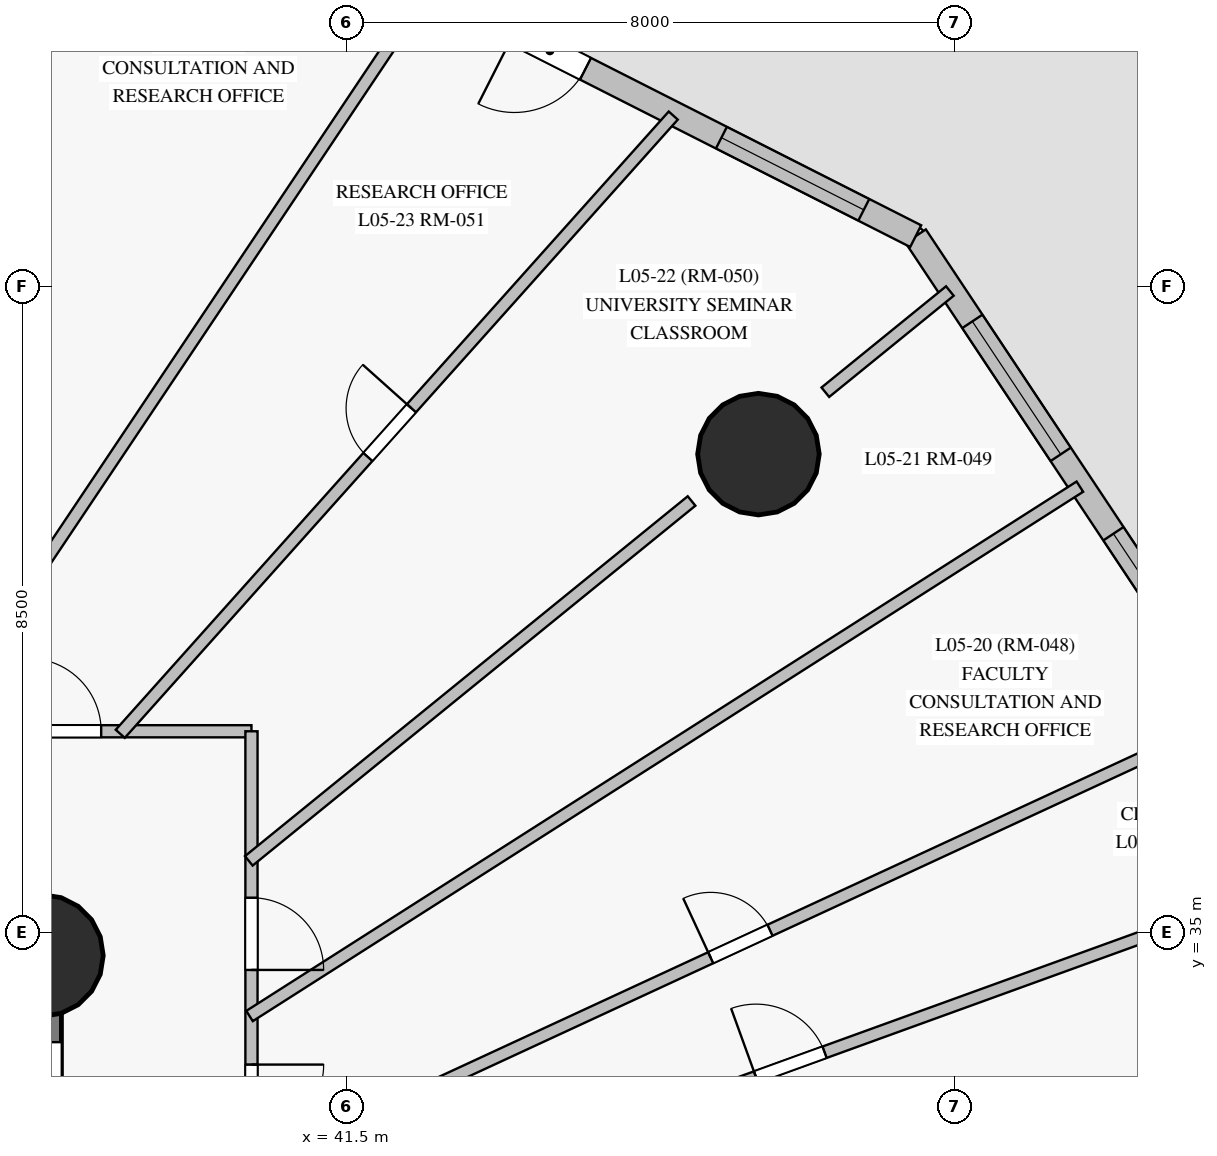
"""IFC4 building model, lengths in metres.
Left out: names, types, materials, properties, quantities, classifications, styles, units other than length and angle.
Written with IfcOpenShell. Run it as: python <this file> out.ifc"""

import sys

from ifc_helpers import new_model, si_unit, direction, frame, frame_2d, origin, origin_with_axes, origin_2d, place, context, subcontext, project, spatial, rectangle, circle, extrude, source, transform, mapped, element, fill, save


model = new_model("IFC4")
c1 = context("Model", 3, precision=1e-05, world=origin(), true_north=direction((0.0, 1.0)))
c2 = subcontext(c1, "Body", "Model", "MODEL_VIEW")
j1 = project(units=[si_unit("LENGTHUNIT", "METRE"), si_unit("PLANEANGLEUNIT", "RADIAN")], contexts=[c1])
p1 = place(None, origin())
s1 = spatial("IfcSite", under=j1, at=p1, CompositionType="ELEMENT")
p2 = place(p1, origin())
s2 = spatial("IfcBuilding", under=s1, at=p2, CompositionType="ELEMENT")
p3 = place(p2, frame((0.0, 0.0, 22.5)))
s3 = spatial("IfcBuildingStorey", under=s2, at=p3, CompositionType="ELEMENT", Elevation=22.5)
p4 = place(p3, frame((37.5, 18.3, 0.0), z_axis=(0.0, 0.0, 1.0), x_axis=(0.0, 1.0, 0.0)))
e1 = element("IfcWall", 1, at=p4, inside=s3, PredefinedType="SHEAR", context=c2, shape_type="SweptSolid", body=[
    extrude(rectangle(XDim=16.4, YDim=0.5, at=frame_2d((8.2, 0.0))), origin(), (0.0, 0.0, 1.0), 3.75),
])
p5 = place(p4, frame((14.06, 0.0, 0.0)))
e2 = element("IfcOpeningElement", 2, at=p5, cuts=e1, PredefinedType="OPENING", context=c2, shape_type="SweptSolid", body=[
    extrude(rectangle(XDim=1.2, YDim=2.15, at=frame_2d((0.6, 1.075))), frame((0.0, 0.26, 0.0), z_axis=(0.0, -1.0, 0.0), x_axis=(1.0, 0.0, 0.0)), (0.0, 0.0, 1.0), 0.52),
])
m1 = source(origin_with_axes(), c2, "Body", "SweptSolid", [
    extrude(circle(Radius=0.8, at=origin_2d()), origin(), (0.0, 0.0, 1.0), 4.0),
])
for number, where, z_axis, x_axis in (
    (3, (37.5, 34.7, 0.0), (0.0, 0.0, 1.0), (1.0, 0.0, 0.0)),
    (4, (46.92, 41.296, 0.0), (0.0, 0.0, 1.0), (1.0, 0.0, 0.0)),
):
    element("IfcColumn", number, at=place(p3, frame(where, z_axis=z_axis, x_axis=x_axis)), inside=s3, PredefinedType="COLUMN", context=c2, shape_type="MappedRepresentation", body=[
        mapped(m1, transform((0.0, 0.0, 0.0), scale=1.0)),
    ])
p6 = place(p3, frame((56.4, 33.01, 0.0), z_axis=(0.0, 0.0, 1.0), x_axis=(-0.553428968968, 0.832896377893, 0.0)))
e5 = element("IfcWall", 5, at=p6, inside=s3, PredefinedType="SOLIDWALL", context=c2, shape_type="SweptSolid", body=[
    extrude(rectangle(XDim=13.391, YDim=0.32, at=frame_2d((6.696, 0.0))), origin(), (0.0, 0.0, 1.0), 3.75),
])
p7 = place(p6, frame((1.064, 0.0, 0.85)))
e6 = element("IfcOpeningElement", 6, at=p7, cuts=e5, PredefinedType="OPENING", context=c2, shape_type="SweptSolid", body=[
    extrude(rectangle(XDim=1.8, YDim=1.85, at=frame_2d((0.9, 0.925))), frame((0.0, 0.17, 0.0), z_axis=(0.0, -1.0, 0.0), x_axis=(1.0, 0.0, 0.0)), (0.0, 0.0, 1.0), 0.34),
])
p8 = place(p6, frame((3.884, 0.0, 0.85)))
e7 = element("IfcOpeningElement", 7, at=p8, cuts=e5, PredefinedType="OPENING", context=c2, shape_type="SweptSolid", body=[
    extrude(rectangle(XDim=1.5, YDim=1.85, at=frame_2d((0.75, 0.925))), frame((0.0, 0.17, 0.0), z_axis=(0.0, -1.0, 0.0), x_axis=(1.0, 0.0, 0.0)), (0.0, 0.0, 1.0), 0.34),
])
p9 = place(p6, frame((6.591, 0.0, 0.85)))
e8 = element("IfcOpeningElement", 8, at=p9, cuts=e5, PredefinedType="OPENING", context=c2, shape_type="SweptSolid", body=[
    extrude(rectangle(XDim=2.1, YDim=1.95, at=frame_2d((1.05, 0.975))), frame((0.0, 0.17, 0.0), z_axis=(0.0, -1.0, 0.0), x_axis=(1.0, 0.0, 0.0)), (0.0, 0.0, 1.0), 0.34),
])
p10 = place(p6, frame((9.945, 0.0, 0.85)))
e9 = element("IfcOpeningElement", 9, at=p10, cuts=e5, PredefinedType="OPENING", context=c2, shape_type="SweptSolid", body=[
    extrude(rectangle(XDim=2.1, YDim=1.95, at=frame_2d((1.05, 0.975))), frame((0.0, 0.17, 0.0), z_axis=(0.0, -1.0, 0.0), x_axis=(1.0, 0.0, 0.0)), (0.0, 0.0, 1.0), 0.34),
])
p11 = place(p3, frame((48.989, 44.164, 0.0), z_axis=(0.0, 0.0, 1.0), x_axis=(-0.891951959997, 0.452130181539, 0.0)))
e10 = element("IfcWall", 10, at=p11, inside=s3, PredefinedType="SOLIDWALL", context=c2, shape_type="SweptSolid", body=[
    extrude(rectangle(XDim=10.79, YDim=0.32, at=frame_2d((5.395, 0.0))), origin(), (0.0, 0.0, 1.0), 3.75),
])
p12 = place(p11, frame((0.766, 0.0, 0.85)))
e11 = element("IfcOpeningElement", 11, at=p12, cuts=e10, PredefinedType="OPENING", context=c2, shape_type="SweptSolid", body=[
    extrude(rectangle(XDim=2.1, YDim=1.95, at=frame_2d((1.05, 0.975))), frame((0.0, 0.17, 0.0), z_axis=(0.0, -1.0, 0.0), x_axis=(1.0, 0.0, 0.0)), (0.0, 0.0, 1.0), 0.34),
])
p13 = place(p11, frame((7.916, 0.0, 0.85)))
e12 = element("IfcOpeningElement", 12, at=p13, cuts=e10, PredefinedType="OPENING", context=c2, shape_type="SweptSolid", body=[
    extrude(rectangle(XDim=2.1, YDim=1.95, at=frame_2d((1.05, 0.975))), frame((0.0, 0.17, 0.0), z_axis=(0.0, -1.0, 0.0), x_axis=(1.0, 0.0, 0.0)), (0.0, 0.0, 1.0), 0.34),
])
p14 = place(p11, frame((4.87, 0.0, 0.0)))
e13 = element("IfcOpeningElement", 13, at=p14, cuts=e10, PredefinedType="OPENING", context=c2, shape_type="SweptSolid", body=[
    extrude(rectangle(XDim=1.05, YDim=2.12, at=frame_2d((0.525, 1.06))), frame((0.0, 0.17, 0.0), z_axis=(0.0, -1.0, 0.0), x_axis=(1.0, 0.0, 0.0)), (0.0, 0.0, 1.0), 0.34),
])
p15 = place(p3, frame((10.5, 37.65, 0.0), z_axis=(0.0, 0.0, 1.0), x_axis=(1.0, 0.0, 0.0)))
e14 = element("IfcWall", 14, at=p15, inside=s3, PredefinedType="PARTITIONING", context=c2, shape_type="SweptSolid", body=[
    extrude(rectangle(XDim=29.75, YDim=0.16, at=frame_2d((14.875, 0.0))), origin(), (0.0, 0.0, 1.0), 3.15),
])
p16 = place(p15, frame((26.813, 0.0, 0.0)))
e15 = element("IfcOpeningElement", 15, at=p16, cuts=e14, PredefinedType="OPENING", context=c2, shape_type="SweptSolid", body=[
    extrude(rectangle(XDim=0.96, YDim=2.15, at=frame_2d((0.48, 1.075))), frame((0.0, 0.09, 0.0), z_axis=(0.0, -1.0, 0.0), x_axis=(1.0, 0.0, 0.0)), (0.0, 0.0, 1.0), 0.18),
])
p17 = place(p15, frame((24.312, 0.0, 0.0)))
e16 = element("IfcOpeningElement", 16, at=p17, cuts=e14, PredefinedType="OPENING", context=c2, shape_type="SweptSolid", body=[
    extrude(rectangle(XDim=0.95, YDim=2.15, at=frame_2d((0.475, 1.075))), frame((0.0, 0.09, 0.0), z_axis=(0.0, -1.0, 0.0), x_axis=(1.0, 0.0, 0.0)), (0.0, 0.0, 1.0), 0.18),
])
p18 = place(p15, frame((21.84, 0.0, 0.0)))
e17 = element("IfcOpeningElement", 17, at=p18, cuts=e14, PredefinedType="OPENING", context=c2, shape_type="SweptSolid", body=[
    extrude(rectangle(XDim=0.95, YDim=2.15, at=frame_2d((0.475, 1.075))), frame((0.0, 0.09, 0.0), z_axis=(0.0, -1.0, 0.0), x_axis=(1.0, 0.0, 0.0)), (0.0, 0.0, 1.0), 0.18),
])
p19 = place(p15, frame((19.498, 0.0, 0.0)))
e18 = element("IfcOpeningElement", 18, at=p19, cuts=e14, PredefinedType="OPENING", context=c2, shape_type="SweptSolid", body=[
    extrude(rectangle(XDim=0.96, YDim=2.15, at=frame_2d((0.48, 1.075))), frame((0.0, 0.09, 0.0), z_axis=(0.0, -1.0, 0.0), x_axis=(1.0, 0.0, 0.0)), (0.0, 0.0, 1.0), 0.18),
])
p20 = place(p15, frame((17.272, 0.0, 0.0)))
e19 = element("IfcOpeningElement", 19, at=p20, cuts=e14, PredefinedType="OPENING", context=c2, shape_type="SweptSolid", body=[
    extrude(rectangle(XDim=0.95, YDim=2.15, at=frame_2d((0.475, 1.075))), frame((0.0, 0.09, 0.0), z_axis=(0.0, -1.0, 0.0), x_axis=(1.0, 0.0, 0.0)), (0.0, 0.0, 1.0), 0.18),
])
p21 = place(p15, frame((15.625, 0.0, 0.0)))
e20 = element("IfcOpeningElement", 20, at=p21, cuts=e14, PredefinedType="OPENING", context=c2, shape_type="SweptSolid", body=[
    extrude(rectangle(XDim=0.95, YDim=2.15, at=frame_2d((0.475, 1.075))), frame((0.0, 0.09, 0.0), z_axis=(0.0, -1.0, 0.0), x_axis=(1.0, 0.0, 0.0)), (0.0, 0.0, 1.0), 0.18),
])
p22 = place(p15, frame((14.4, 0.0, 0.0)))
e21 = element("IfcOpeningElement", 21, at=p22, cuts=e14, PredefinedType="OPENING", context=c2, shape_type="SweptSolid", body=[
    extrude(rectangle(XDim=0.96, YDim=2.15, at=frame_2d((0.48, 1.075))), frame((0.0, 0.09, 0.0), z_axis=(0.0, -1.0, 0.0), x_axis=(1.0, 0.0, 0.0)), (0.0, 0.0, 1.0), 0.18),
])
p23 = place(p15, frame((9.938, 0.0, 0.0)))
e22 = element("IfcOpeningElement", 22, at=p23, cuts=e14, PredefinedType="OPENING", context=c2, shape_type="SweptSolid", body=[
    extrude(rectangle(XDim=0.95, YDim=2.15, at=frame_2d((0.475, 1.075))), frame((0.0, 0.09, 0.0), z_axis=(0.0, -1.0, 0.0), x_axis=(1.0, 0.0, 0.0)), (0.0, 0.0, 1.0), 0.18),
])
p24 = place(p3, frame((40.25, 37.65, 0.0), z_axis=(0.0, 0.0, 1.0), x_axis=(0.0, -1.0, 0.0)))
e23 = element("IfcWall", 23, at=p24, inside=s3, PredefinedType="PARTITIONING", context=c2, shape_type="SweptSolid", body=[
    extrude(rectangle(XDim=22.3, YDim=0.16, at=frame_2d((11.15, 0.0))), origin(), (0.0, 0.0, 1.0), 3.15),
])
p25 = place(p24, frame((16.25, 0.0, 0.0)))
e24 = element("IfcOpeningElement", 24, at=p25, cuts=e23, PredefinedType="OPENING", context=c2, shape_type="SweptSolid", body=[
    extrude(rectangle(XDim=0.95, YDim=2.15, at=frame_2d((0.475, 1.075))), frame((0.0, 0.09, 0.0), z_axis=(0.0, -1.0, 0.0), x_axis=(1.0, 0.0, 0.0)), (0.0, 0.0, 1.0), 0.18),
])
p26 = place(p24, frame((14.06, 0.0, 0.0)))
e25 = element("IfcOpeningElement", 25, at=p26, cuts=e23, PredefinedType="OPENING", context=c2, shape_type="SweptSolid", body=[
    extrude(rectangle(XDim=0.96, YDim=2.15, at=frame_2d((0.48, 1.075))), frame((0.0, 0.09, 0.0), z_axis=(0.0, -1.0, 0.0), x_axis=(1.0, 0.0, 0.0)), (0.0, 0.0, 1.0), 0.18),
])
p27 = place(p24, frame((12.235, 0.0, 0.0)))
e26 = element("IfcOpeningElement", 26, at=p27, cuts=e23, PredefinedType="OPENING", context=c2, shape_type="SweptSolid", body=[
    extrude(rectangle(XDim=0.95, YDim=2.15, at=frame_2d((0.475, 1.075))), frame((0.0, 0.09, 0.0), z_axis=(0.0, -1.0, 0.0), x_axis=(1.0, 0.0, 0.0)), (0.0, 0.0, 1.0), 0.18),
])
p28 = place(p24, frame((4.385, 0.0, 0.0)))
e27 = element("IfcOpeningElement", 27, at=p28, cuts=e23, PredefinedType="OPENING", context=c2, shape_type="SweptSolid", body=[
    extrude(rectangle(XDim=0.95, YDim=2.15, at=frame_2d((0.475, 1.075))), frame((0.0, 0.09, 0.0), z_axis=(0.0, -1.0, 0.0), x_axis=(1.0, 0.0, 0.0)), (0.0, 0.0, 1.0), 0.18),
])
p29 = place(p24, frame((2.19, 0.0, 0.0)))
e28 = element("IfcOpeningElement", 28, at=p29, cuts=e23, PredefinedType="OPENING", context=c2, shape_type="SweptSolid", body=[
    extrude(rectangle(XDim=0.95, YDim=2.15, at=frame_2d((0.475, 1.075))), frame((0.0, 0.09, 0.0), z_axis=(0.0, -1.0, 0.0), x_axis=(1.0, 0.0, 0.0)), (0.0, 0.0, 1.0), 0.18),
])
p30 = place(p24, frame((17.358, 0.0, 0.0)))
e29 = element("IfcOpeningElement", 29, at=p30, cuts=e23, PredefinedType="OPENING", context=c2, shape_type="SweptSolid", body=[
    extrude(rectangle(XDim=0.95, YDim=2.15, at=frame_2d((0.475, 1.075))), frame((0.0, 0.09, 0.0), z_axis=(0.0, -1.0, 0.0), x_axis=(1.0, 0.0, 0.0)), (0.0, 0.0, 1.0), 0.18),
])
p31 = place(p24, frame((18.489, 0.0, 0.0)))
e30 = element("IfcOpeningElement", 30, at=p31, cuts=e23, PredefinedType="OPENING", context=c2, shape_type="SweptSolid", body=[
    extrude(rectangle(XDim=0.95, YDim=2.15, at=frame_2d((0.475, 1.075))), frame((0.0, 0.09, 0.0), z_axis=(0.0, -1.0, 0.0), x_axis=(1.0, 0.0, 0.0)), (0.0, 0.0, 1.0), 0.18),
])
p32 = place(p24, frame((10.61, 0.0, 0.0)))
e31 = element("IfcOpeningElement", 31, at=p32, cuts=e23, PredefinedType="OPENING", context=c2, shape_type="SweptSolid", body=[
    extrude(rectangle(XDim=0.86, YDim=2.04, at=frame_2d((0.43, 1.02))), frame((0.0, 0.09, 0.0), z_axis=(0.0, -1.0, 0.0), x_axis=(1.0, 0.0, 0.0)), (0.0, 0.0, 1.0), 0.18),
])
p33 = place(p24, frame((8.378, 0.0, 0.0)))
e32 = element("IfcOpeningElement", 32, at=p33, cuts=e23, PredefinedType="OPENING", context=c2, shape_type="SweptSolid", body=[
    extrude(rectangle(XDim=0.86, YDim=2.04, at=frame_2d((0.43, 1.02))), frame((0.0, 0.09, 0.0), z_axis=(0.0, -1.0, 0.0), x_axis=(1.0, 0.0, 0.0)), (0.0, 0.0, 1.0), 0.18),
])
p34 = place(p24, frame((7.144, 0.0, 0.0)))
e33 = element("IfcOpeningElement", 33, at=p34, cuts=e23, PredefinedType="OPENING", context=c2, shape_type="SweptSolid", body=[
    extrude(rectangle(XDim=0.86, YDim=2.04, at=frame_2d((0.43, 1.02))), frame((0.0, 0.09, 0.0), z_axis=(0.0, -1.0, 0.0), x_axis=(1.0, 0.0, 0.0)), (0.0, 0.0, 1.0), 0.18),
])
p35 = place(p3, frame((40.206, 29.387, 0.0), z_axis=(0.0, 0.0, 1.0), x_axis=(0.969703998049, 0.24428294285, 0.0)))
e34 = element("IfcWall", 34, at=p35, inside=s3, PredefinedType="PARTITIONING", context=c2, shape_type="SweptSolid", body=[
    extrude(rectangle(XDim=16.401, YDim=0.16, at=frame_2d((8.201, 0.0))), origin(), (0.0, 0.0, 1.0), 3.75),
])
p36 = place(p35, frame((7.701, 0.0, 0.0)))
e35 = element("IfcOpeningElement", 35, at=p36, cuts=e34, PredefinedType="OPENING", context=c2, shape_type="SweptSolid", body=[
    extrude(rectangle(XDim=0.95, YDim=2.15, at=frame_2d((0.475, 1.075))), frame((0.0, 0.09, 0.0), z_axis=(0.0, -1.0, 0.0), x_axis=(1.0, 0.0, 0.0)), (0.0, 0.0, 1.0), 0.18),
])
p37 = place(p3, frame((40.222, 30.685, 0.0), z_axis=(0.0, 0.0, 1.0), x_axis=(0.940161852345, 0.340728178166, 0.0)))
e36 = element("IfcWall", 36, at=p37, inside=s3, PredefinedType="PARTITIONING", context=c2, shape_type="SweptSolid", body=[
    extrude(rectangle(XDim=15.165, YDim=0.16, at=frame_2d((7.583, 0.0))), origin(), (0.0, 0.0, 1.0), 3.75),
])
p38 = place(p37, frame((7.09, 0.0, 0.0)))
e37 = element("IfcOpeningElement", 37, at=p38, cuts=e36, PredefinedType="OPENING", context=c2, shape_type="SweptSolid", body=[
    extrude(rectangle(XDim=0.96, YDim=2.15, at=frame_2d((0.48, 1.075))), frame((0.0, 0.09, 0.0), z_axis=(0.0, -1.0, 0.0), x_axis=(1.0, 0.0, 0.0)), (0.0, 0.0, 1.0), 0.18),
])
p39 = place(p3, frame((40.209, 31.855, 0.0), z_axis=(0.0, 0.0, 1.0), x_axis=(0.907470894389, 0.420114955502, 0.0)))
e38 = element("IfcWall", 38, at=p39, inside=s3, PredefinedType="PARTITIONING", context=c2, shape_type="SweptSolid", body=[
    extrude(rectangle(XDim=14.266, YDim=0.16, at=frame_2d((7.133, 0.0))), origin(), (0.0, 0.0, 1.0), 3.75),
])
p40 = place(p39, frame((6.703, 0.0, 0.0)))
e39 = element("IfcOpeningElement", 39, at=p40, cuts=e38, PredefinedType="OPENING", context=c2, shape_type="SweptSolid", body=[
    extrude(rectangle(XDim=0.86, YDim=2.04, at=frame_2d((0.43, 1.02))), frame((0.0, 0.09, 0.0), z_axis=(0.0, -1.0, 0.0), x_axis=(1.0, 0.0, 0.0)), (0.0, 0.0, 1.0), 0.18),
])
p41 = place(p3, frame((40.225, 33.904, 0.0), z_axis=(0.0, 0.0, 1.0), x_axis=(0.843218121952, 0.537571575524, 0.0)))
e40 = element("IfcWall", 40, at=p41, inside=s3, PredefinedType="PARTITIONING", context=c2, shape_type="SweptSolid", body=[
    extrude(rectangle(XDim=12.955, YDim=0.16, at=frame_2d((6.478, 0.0))), origin(), (0.0, 0.0, 1.0), 3.75),
])
p42 = place(p3, frame((33.518, 37.623, 0.0), z_axis=(0.0, 0.0, 1.0), x_axis=(0.40672565057, 0.913550351742, 0.0)))
e41 = element("IfcWall", 41, at=p42, inside=s3, PredefinedType="PARTITIONING", context=c2, shape_type="SweptSolid", body=[
    extrude(rectangle(XDim=12.497, YDim=0.16, at=frame_2d((6.249, 0.0))), origin(), (0.0, 0.0, 1.0), 3.75),
])
p43 = place(p3, frame((36.01, 37.613, 0.0), z_axis=(0.0, 0.0, 1.0), x_axis=(0.556249955488, 0.831015034172, 0.0)))
e42 = element("IfcWall", 42, at=p43, inside=s3, PredefinedType="PARTITIONING", context=c2, shape_type="SweptSolid", body=[
    extrude(rectangle(XDim=11.771, YDim=0.16, at=frame_2d((5.886, 0.0))), origin(), (0.0, 0.0, 1.0), 3.75),
])
p44 = place(p3, frame((38.524, 37.616, 0.0), z_axis=(0.0, 0.0, 1.0), x_axis=(0.666694800969, 0.745330827459, 0.0)))
e43 = element("IfcWall", 43, at=p44, inside=s3, PredefinedType="PARTITIONING", context=c2, shape_type="SweptSolid", body=[
    extrude(rectangle(XDim=10.913, YDim=0.16, at=frame_2d((5.457, 0.0))), origin(), (0.0, 0.0, 1.0), 3.75),
])
p45 = place(p44, frame((4.886, 0.0, 0.0)))
e44 = element("IfcOpeningElement", 44, at=p45, cuts=e43, PredefinedType="OPENING", context=c2, shape_type="SweptSolid", body=[
    extrude(rectangle(XDim=0.86, YDim=2.04, at=frame_2d((0.43, 1.02))), frame((0.0, 0.09, 0.0), z_axis=(0.0, -1.0, 0.0), x_axis=(1.0, 0.0, 0.0)), (0.0, 0.0, 1.0), 0.18),
])
p46 = place(p3, frame((40.215, 35.945, 0.0), z_axis=(0.0, 0.0, 1.0), x_axis=(0.77599360837, 0.630740770657, 0.0)))
e45 = element("IfcWall", 45, at=p46, inside=s3, PredefinedType="PARTITIONING", context=c2, shape_type="SweptSolid", body=[
    extrude(rectangle(XDim=7.506, YDim=0.16, at=frame_2d((3.753, 0.0))), origin(), (0.0, 0.0, 1.0), 3.1),
])
p47 = place(p3, frame((47.8, 42.11, 0.0), z_axis=(0.0, 0.0, 1.0), x_axis=(0.775937110076, 0.630810273542, 0.0)))
e46 = element("IfcWall", 46, at=p47, inside=s3, PredefinedType="PARTITIONING", context=c2, shape_type="SweptSolid", body=[
    extrude(rectangle(XDim=2.111, YDim=0.16, at=frame_2d((1.056, 0.0))), origin(), (0.0, 0.0, 1.0), 3.75),
])
m2 = source(origin_with_axes(), c2, "Body", "SweptSolid", [
    extrude(rectangle(XDim=2.1, YDim=1.95, at=frame_2d((1.05, 0.975))), frame((0.0, 0.03, 0.0), z_axis=(0.0, -1.0, 0.0), x_axis=(1.0, 0.0, 0.0)), (0.0, 0.0, 1.0), 0.06),
])
p48 = place(p9, origin())
e47 = element("IfcWindow", 47, at=p48, inside=s3, PartitioningType="SINGLE_PANEL", PredefinedType="WINDOW", context=c2, shape_type="MappedRepresentation", body=[
    mapped(m2, transform((0.0, 0.0, 0.0), scale=1.0)),
])
fill(e8, e47)
p49 = place(p10, origin())
e48 = element("IfcWindow", 48, at=p49, inside=s3, PartitioningType="SINGLE_PANEL", PredefinedType="WINDOW", context=c2, shape_type="MappedRepresentation", body=[
    mapped(m2, transform((0.0, 0.0, 0.0), scale=1.0)),
])
fill(e9, e48)
p50 = place(p12, origin())
e49 = element("IfcWindow", 49, at=p50, inside=s3, PartitioningType="SINGLE_PANEL", PredefinedType="WINDOW", context=c2, shape_type="MappedRepresentation", body=[
    mapped(m2, transform((0.0, 0.0, 0.0), scale=1.0)),
])
fill(e11, e49)
m3 = source(origin_with_axes(), c2, "Body", "SweptSolid", [
    extrude(rectangle(XDim=1.05, YDim=2.12, at=frame_2d((0.525, 1.06))), frame((0.0, 0.025, 0.0), z_axis=(0.0, -1.0, 0.0), x_axis=(1.0, 0.0, 0.0)), (0.0, 0.0, 1.0), 0.05),
])
p51 = place(p14, origin())
e50 = element("IfcDoor", 50, at=p51, inside=s3, OperationType="SINGLE_SWING_RIGHT", PredefinedType="DOOR", context=c2, shape_type="MappedRepresentation", body=[
    mapped(m3, transform((0.0, 0.0, 0.0), scale=1.0)),
])
fill(e13, e50)
m4 = source(origin_with_axes(), c2, "Body", "SweptSolid", [
    extrude(rectangle(XDim=0.95, YDim=2.15, at=frame_2d((0.475, 1.075))), frame((0.0, 0.025, 0.0), z_axis=(0.0, -1.0, 0.0), x_axis=(1.0, 0.0, 0.0)), (0.0, 0.0, 1.0), 0.05),
])
p52 = place(p28, origin())
e51 = element("IfcDoor", 51, at=p52, inside=s3, OperationType="SINGLE_SWING_LEFT", PredefinedType="DOOR", context=c2, shape_type="MappedRepresentation", body=[
    mapped(m4, transform((0.0, 0.0, 0.0), scale=1.0)),
])
fill(e27, e51)
p53 = place(p29, origin())
e52 = element("IfcDoor", 52, at=p53, inside=s3, OperationType="SINGLE_SWING_RIGHT", PredefinedType="DOOR", context=c2, shape_type="MappedRepresentation", body=[
    mapped(m4, transform((0.0, 0.0, 0.0), scale=1.0)),
])
fill(e28, e52)
m5 = source(origin_with_axes(), c2, "Body", "SweptSolid", [
    extrude(rectangle(XDim=0.96, YDim=2.15, at=frame_2d((0.48, 1.075))), frame((0.0, 0.025, 0.0), z_axis=(0.0, -1.0, 0.0), x_axis=(1.0, 0.0, 0.0)), (0.0, 0.0, 1.0), 0.05),
])
p54 = place(p16, origin())
e53 = element("IfcDoor", 53, at=p54, inside=s3, OperationType="SINGLE_SWING_LEFT", PredefinedType="DOOR", context=c2, shape_type="MappedRepresentation", body=[
    mapped(m5, transform((0.0, 0.0, 0.0), scale=1.0)),
])
fill(e15, e53)
p55 = place(p38, origin())
e54 = element("IfcDoor", 54, at=p55, inside=s3, OperationType="SINGLE_SWING_LEFT", PredefinedType="DOOR", context=c2, shape_type="MappedRepresentation", body=[
    mapped(m5, transform((0.0, 0.0, 0.0), scale=1.0)),
])
fill(e37, e54)
m6 = source(origin_with_axes(), c2, "Body", "SweptSolid", [
    extrude(rectangle(XDim=0.86, YDim=2.04, at=frame_2d((0.43, 1.02))), frame((0.0, 0.025, 0.0), z_axis=(0.0, -1.0, 0.0), x_axis=(1.0, 0.0, 0.0)), (0.0, 0.0, 1.0), 0.05),
])
p56 = place(p40, origin())
e55 = element("IfcDoor", 55, at=p56, inside=s3, OperationType="SINGLE_SWING_LEFT", PredefinedType="DOOR", context=c2, shape_type="MappedRepresentation", body=[
    mapped(m6, transform((0.0, 0.0, 0.0), scale=1.0)),
])
fill(e39, e55)
p57 = place(p45, origin())
e56 = element("IfcDoor", 56, at=p57, inside=s3, OperationType="SINGLE_SWING_RIGHT", PredefinedType="DOOR", context=c2, shape_type="MappedRepresentation", body=[
    mapped(m6, transform((0.0, 0.0, 0.0), scale=1.0)),
])
fill(e44, e56)
save(model, sys.argv[1])
